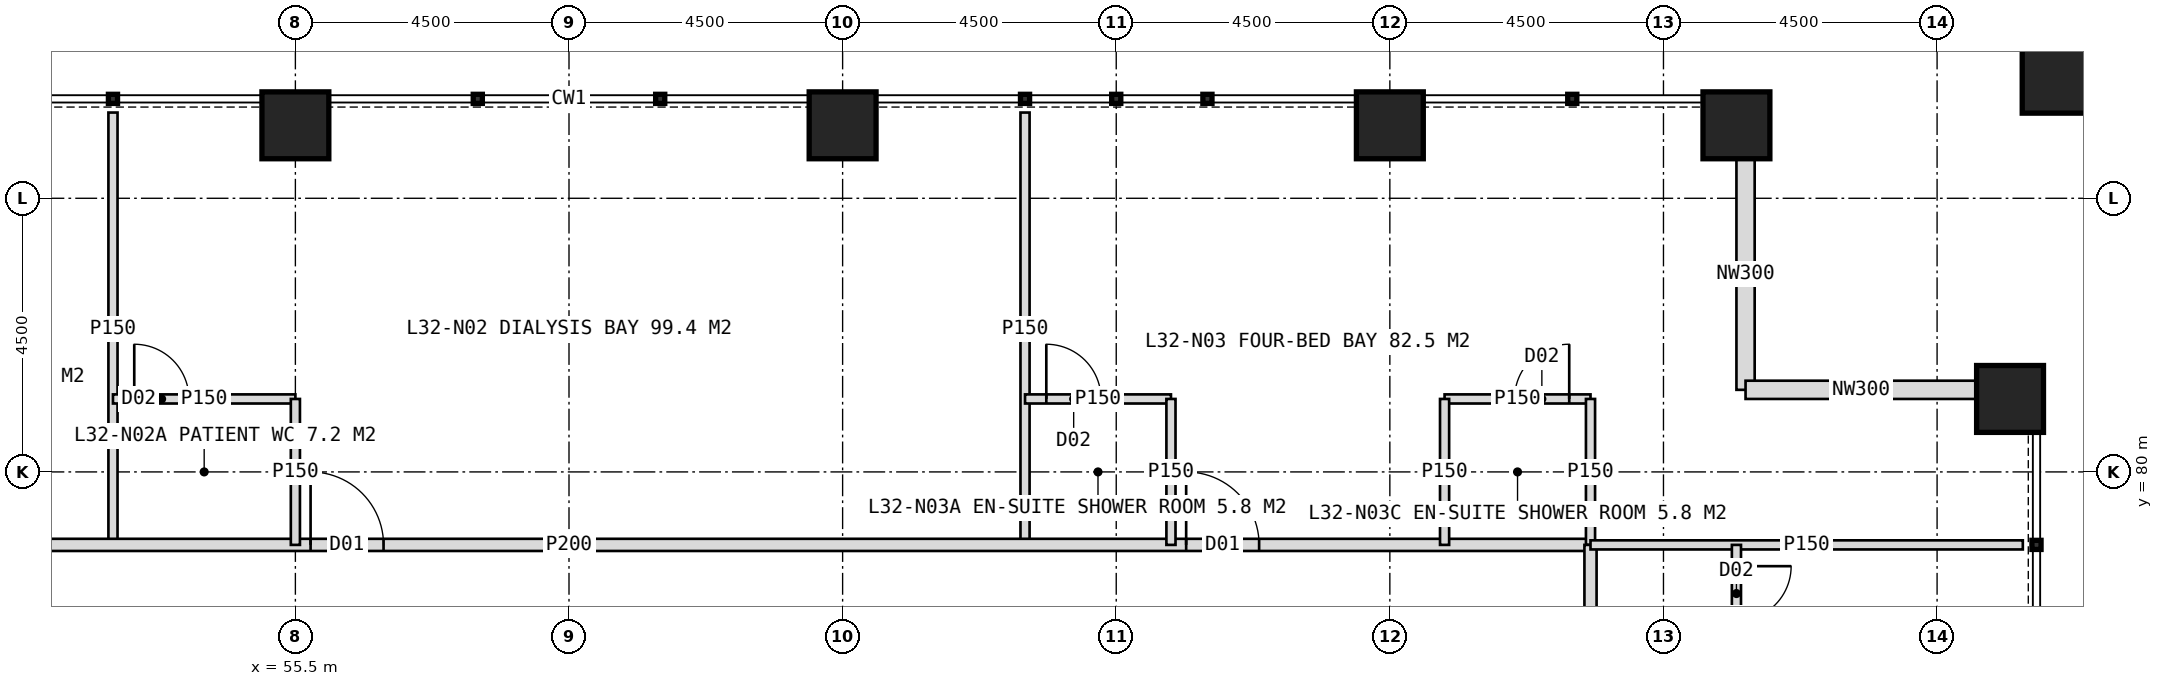
"""IFC4 building model, lengths in metres.
Left out: names, types, materials, properties, quantities, classifications, styles, units other than length and angle.
Written with IfcOpenShell. Run it as: python <this file> out.ifc"""

import sys

from ifc_helpers import new_model, si_unit, direction, frame, frame_2d, origin, origin_2d, place, context, subcontext, project, spatial, rectangle, hollow_rectangle, extrude, element, fill, save


model = new_model("IFC4")
c1 = context("Model", 3, precision=1e-05, world=origin(), true_north=direction((0.0, 1.0)))
c2 = subcontext(c1, "Body", "Model", "MODEL_VIEW")
j1 = project(units=[si_unit("LENGTHUNIT", "METRE"), si_unit("PLANEANGLEUNIT", "RADIAN")], contexts=[c1])
p1 = place(None, origin())
s1 = spatial("IfcSite", under=j1, at=p1, CompositionType="ELEMENT")
p2 = place(p1, origin())
s2 = spatial("IfcBuilding", under=s1, at=p2, CompositionType="ELEMENT")
p3 = place(p2, frame((0.0, 0.0, 136.0)))
s3 = spatial("IfcBuildingStorey", under=s2, at=p3, CompositionType="ELEMENT", Elevation=136.0)
for number, where, z_axis, x_axis in (
    (1, (55.5, 85.7, 0.0), (0.0, 0.0, 1.0), (1.0, 0.0, 0.0)),
    (2, (64.5, 85.7, 0.0), (0.0, 0.0, 1.0), (1.0, 0.0, 0.0)),
    (3, (73.5, 85.7, 0.0), (0.0, 0.0, 1.0), (1.0, 0.0, 0.0)),
    (4, (79.2, 85.7, 0.0), (0.0, 0.0, 1.0), (1.0, 0.0, 0.0)),
    (5, (83.7, 81.2, 0.0), (0.0, 0.0, 1.0), (1.0, 0.0, 0.0)),
):
    element("IfcColumn", number, at=place(p3, frame(where, z_axis=z_axis, x_axis=x_axis)), inside=s3, PredefinedType="COLUMN", context=c2, shape_type="SweptSolid", body=[
        extrude(hollow_rectangle(XDim=1.1, YDim=1.1, WallThickness=0.1, at=origin_2d()), origin(), (0.0, 0.0, 1.0), 4.0),
    ])
p4 = place(p3, frame((84.6, 86.6, 0.0), z_axis=(0.0, 0.0, 1.0), x_axis=(1.0, 0.0, 0.0)))
e6 = element("IfcColumn", 6, at=p4, inside=s3, PredefinedType="COLUMN", context=c2, shape_type="SweptSolid", body=[
    extrude(hollow_rectangle(XDim=1.4, YDim=1.4, WallThickness=0.08, at=origin_2d()), origin(), (0.0, 0.0, 1.0), 4.0),
])
for number, where, z_axis, x_axis in (
    (7, (79.35, 85.15, 0.0), (0.0, 0.0, 1.0), (0.0, -1.0, 0.0)),
    (8, (79.35, 81.35, 0.0), (0.0, 0.0, 1.0), (1.0, 0.0, 0.0)),
):
    element("IfcWall", number, at=place(p3, frame(where, z_axis=z_axis, x_axis=x_axis)), inside=s3, PredefinedType="ELEMENTEDWALL", context=c2, shape_type="SweptSolid", body=[
        extrude(rectangle(XDim=3.8, YDim=0.3, at=frame_2d((1.9, 0.0))), origin(), (0.0, 0.0, 1.0), 4.0),
    ])
for number, where, z_axis, x_axis in (
    (9, (52.5, 78.8, 0.0), (0.0, 0.0, 1.0), (0.0, 1.0, 0.0)),
    (10, (67.5, 78.8, 0.0), (0.0, 0.0, 1.0), (0.0, 1.0, 0.0)),
):
    element("IfcWall", number, at=place(p3, frame(where, z_axis=z_axis, x_axis=x_axis)), inside=s3, PredefinedType="PARTITIONING", context=c2, shape_type="SweptSolid", body=[
        extrude(rectangle(XDim=7.11, YDim=0.15, at=frame_2d((3.555, 0.0))), origin(), (0.0, 0.0, 1.0), 3.75),
    ])
p5 = place(p3, frame((43.2, 78.8, 0.0), z_axis=(0.0, 0.0, 1.0), x_axis=(1.0, 0.0, 0.0)))
e11 = element("IfcWall", 11, at=p5, inside=s3, PredefinedType="PARTITIONING", context=c2, shape_type="SweptSolid", body=[
    extrude(rectangle(XDim=33.6, YDim=0.2, at=frame_2d((16.8, 0.0))), origin(), (0.0, 0.0, 1.0), 3.75),
])
p6 = place(p5, frame((3.25, 0.0, 0.0)))
e12 = element("IfcOpeningElement", 12, at=p6, cuts=e11, PredefinedType="OPENING", context=c2, shape_type="SweptSolid", body=[
    extrude(rectangle(XDim=1.2, YDim=2.2, at=frame_2d((0.6, 1.1))), frame((0.0, 0.11, 0.0), z_axis=(0.0, -1.0, 0.0), x_axis=(1.0, 0.0, 0.0)), (0.0, 0.0, 1.0), 0.22),
])
p7 = place(p5, frame((12.55, 0.0, 0.0)))
e13 = element("IfcOpeningElement", 13, at=p7, cuts=e11, PredefinedType="OPENING", context=c2, shape_type="SweptSolid", body=[
    extrude(rectangle(XDim=1.2, YDim=2.2, at=frame_2d((0.6, 1.1))), frame((0.0, 0.11, 0.0), z_axis=(0.0, -1.0, 0.0), x_axis=(1.0, 0.0, 0.0)), (0.0, 0.0, 1.0), 0.22),
])
p8 = place(p5, frame((26.95, 0.0, 0.0)))
e14 = element("IfcOpeningElement", 14, at=p8, cuts=e11, PredefinedType="OPENING", context=c2, shape_type="SweptSolid", body=[
    extrude(rectangle(XDim=1.2, YDim=2.2, at=frame_2d((0.6, 1.1))), frame((0.0, 0.11, 0.0), z_axis=(0.0, -1.0, 0.0), x_axis=(1.0, 0.0, 0.0)), (0.0, 0.0, 1.0), 0.22),
])
p9 = place(p3, frame((52.5, 81.2, 0.0), z_axis=(0.0, 0.0, 1.0), x_axis=(1.0, 0.0, 0.0)))
e15 = element("IfcWall", 15, at=p9, inside=s3, PredefinedType="PARTITIONING", context=c2, shape_type="SweptSolid", body=[
    extrude(rectangle(XDim=3.0, YDim=0.15, at=frame_2d((1.5, 0.0))), origin(), (0.0, 0.0, 1.0), 3.75),
])
p10 = place(p9, frame((0.35, 0.0, 0.0)))
e16 = element("IfcOpeningElement", 16, at=p10, cuts=e15, PredefinedType="OPENING", context=c2, shape_type="SweptSolid", body=[
    extrude(rectangle(XDim=0.9, YDim=2.1, at=frame_2d((0.45, 1.05))), frame((0.0, 0.085, 0.0), z_axis=(0.0, -1.0, 0.0), x_axis=(1.0, 0.0, 0.0)), (0.0, 0.0, 1.0), 0.17),
])
p11 = place(p3, frame((55.5, 78.8, 0.0), z_axis=(0.0, 0.0, 1.0), x_axis=(0.0, 1.0, 0.0)))
e17 = element("IfcWall", 17, at=p11, inside=s3, PredefinedType="PARTITIONING", context=c2, shape_type="SweptSolid", body=[
    extrude(rectangle(XDim=2.4, YDim=0.15, at=frame_2d((1.2, 0.0))), origin(), (0.0, 0.0, 1.0), 2.95),
])
p12 = place(p3, frame((67.5, 81.2, 0.0), z_axis=(0.0, 0.0, 1.0), x_axis=(1.0, 0.0, 0.0)))
e18 = element("IfcWall", 18, at=p12, inside=s3, PredefinedType="PARTITIONING", context=c2, shape_type="SweptSolid", body=[
    extrude(rectangle(XDim=2.4, YDim=0.15, at=frame_2d((1.2, 0.0))), origin(), (0.0, 0.0, 1.0), 3.75),
])
p13 = place(p12, frame((0.35, 0.0, 0.0)))
e19 = element("IfcOpeningElement", 19, at=p13, cuts=e18, PredefinedType="OPENING", context=c2, shape_type="SweptSolid", body=[
    extrude(rectangle(XDim=0.9, YDim=2.1, at=frame_2d((0.45, 1.05))), frame((0.0, 0.085, 0.0), z_axis=(0.0, -1.0, 0.0), x_axis=(1.0, 0.0, 0.0)), (0.0, 0.0, 1.0), 0.17),
])
p14 = place(p3, frame((69.9, 78.8, 0.0), z_axis=(0.0, 0.0, 1.0), x_axis=(0.0, 1.0, 0.0)))
e20 = element("IfcWall", 20, at=p14, inside=s3, PredefinedType="PARTITIONING", context=c2, shape_type="SweptSolid", body=[
    extrude(rectangle(XDim=2.4, YDim=0.15, at=frame_2d((1.2, 0.0))), origin(), (0.0, 0.0, 1.0), 3.75),
])
p15 = place(p3, frame((74.4, 81.2, 0.0), z_axis=(0.0, 0.0, 1.0), x_axis=(1.0, 0.0, 0.0)))
e21 = element("IfcWall", 21, at=p15, inside=s3, PredefinedType="PARTITIONING", context=c2, shape_type="SweptSolid", body=[
    extrude(rectangle(XDim=2.4, YDim=0.15, at=frame_2d((1.2, 0.0))), origin(), (0.0, 0.0, 1.0), 2.997),
])
p16 = place(p15, frame((1.15, 0.0, 0.0)))
e22 = element("IfcOpeningElement", 22, at=p16, cuts=e21, PredefinedType="OPENING", context=c2, shape_type="SweptSolid", body=[
    extrude(rectangle(XDim=0.9, YDim=2.1, at=frame_2d((0.45, 1.05))), frame((0.0, 0.085, 0.0), z_axis=(0.0, -1.0, 0.0), x_axis=(1.0, 0.0, 0.0)), (0.0, 0.0, 1.0), 0.17),
])
for number, where, z_axis, x_axis in (
    (23, (74.4, 78.8, 0.0), (0.0, 0.0, 1.0), (0.0, 1.0, 0.0)),
    (24, (76.8, 78.8, 0.0), (0.0, 0.0, 1.0), (0.0, 1.0, 0.0)),
):
    element("IfcWall", number, at=place(p3, frame(where, z_axis=z_axis, x_axis=x_axis)), inside=s3, PredefinedType="PARTITIONING", context=c2, shape_type="SweptSolid", body=[
        extrude(rectangle(XDim=2.4, YDim=0.15, at=frame_2d((1.2, 0.0))), origin(), (0.0, 0.0, 1.0), 3.75),
    ])
p17 = place(p3, frame((76.8, 78.8, 0.0), z_axis=(0.0, 0.0, 1.0), x_axis=(0.0, -1.0, 0.0)))
e25 = element("IfcWall", 25, at=p17, inside=s3, PredefinedType="PARTITIONING", context=c2, shape_type="SweptSolid", body=[
    extrude(rectangle(XDim=33.6, YDim=0.2, at=frame_2d((16.8, 0.0))), origin(), (0.0, 0.0, 1.0), 3.75),
])
p18 = place(p17, frame((2.65, 0.0, 0.0)))
e26 = element("IfcOpeningElement", 26, at=p18, cuts=e25, PredefinedType="OPENING", context=c2, shape_type="SweptSolid", body=[
    extrude(rectangle(XDim=1.2, YDim=2.2, at=frame_2d((0.6, 1.1))), frame((0.0, 0.11, 0.0), z_axis=(0.0, -1.0, 0.0), x_axis=(1.0, 0.0, 0.0)), (0.0, 0.0, 1.0), 0.22),
])
p19 = place(p17, frame((8.95, 0.0, 0.0)))
e27 = element("IfcOpeningElement", 27, at=p19, cuts=e25, PredefinedType="OPENING", context=c2, shape_type="SweptSolid", body=[
    extrude(rectangle(XDim=1.2, YDim=2.2, at=frame_2d((0.6, 1.1))), frame((0.0, 0.11, 0.0), z_axis=(0.0, -1.0, 0.0), x_axis=(1.0, 0.0, 0.0)), (0.0, 0.0, 1.0), 0.22),
])
p20 = place(p17, frame((19.45, 0.0, 0.0)))
e28 = element("IfcOpeningElement", 28, at=p20, cuts=e25, PredefinedType="OPENING", context=c2, shape_type="SweptSolid", body=[
    extrude(rectangle(XDim=1.2, YDim=2.2, at=frame_2d((0.6, 1.1))), frame((0.0, 0.11, 0.0), z_axis=(0.0, -1.0, 0.0), x_axis=(1.0, 0.0, 0.0)), (0.0, 0.0, 1.0), 0.22),
])
p21 = place(p17, frame((28.45, 0.0, 0.0)))
e29 = element("IfcOpeningElement", 29, at=p21, cuts=e25, PredefinedType="OPENING", context=c2, shape_type="SweptSolid", body=[
    extrude(rectangle(XDim=1.2, YDim=2.2, at=frame_2d((0.6, 1.1))), frame((0.0, 0.11, 0.0), z_axis=(0.0, -1.0, 0.0), x_axis=(1.0, 0.0, 0.0)), (0.0, 0.0, 1.0), 0.22),
])
p22 = place(p3, frame((76.8, 78.8, 0.0), z_axis=(0.0, 0.0, 1.0), x_axis=(1.0, 0.0, 0.0)))
e30 = element("IfcWall", 30, at=p22, inside=s3, PredefinedType="PARTITIONING", context=c2, shape_type="SweptSolid", body=[
    extrude(rectangle(XDim=7.11, YDim=0.15, at=frame_2d((3.555, 0.0))), origin(), (0.0, 0.0, 1.0), 3.75),
])
p23 = place(p3, frame((79.2, 78.8, 0.0), z_axis=(0.0, 0.0, 1.0), x_axis=(0.0, -1.0, 0.0)))
e31 = element("IfcWall", 31, at=p23, inside=s3, PredefinedType="PARTITIONING", context=c2, shape_type="SweptSolid", body=[
    extrude(rectangle(XDim=2.4, YDim=0.15, at=frame_2d((1.2, 0.0))), origin(), (0.0, 0.0, 1.0), 2.997),
])
p24 = place(p23, frame((0.35, 0.0, 0.0)))
e32 = element("IfcOpeningElement", 32, at=p24, cuts=e31, PredefinedType="OPENING", context=c2, shape_type="SweptSolid", body=[
    extrude(rectangle(XDim=0.9, YDim=2.1, at=frame_2d((0.45, 1.05))), frame((0.0, 0.085, 0.0), z_axis=(0.0, -1.0, 0.0), x_axis=(1.0, 0.0, 0.0)), (0.0, 0.0, 1.0), 0.17),
])
p25 = place(p7, origin())
e33 = element("IfcDoor", 33, at=p25, inside=s3, OperationType="SINGLE_SWING_LEFT", PredefinedType="DOOR", context=c2, shape_type="SweptSolid", body=[
    extrude(rectangle(XDim=1.2, YDim=2.2, at=frame_2d((0.6, 1.1))), frame((0.0, 0.025, 0.0), z_axis=(0.0, -1.0, 0.0), x_axis=(1.0, 0.0, 0.0)), (0.0, 0.0, 1.0), 0.05),
])
fill(e13, e33)
p26 = place(p10, origin())
e34 = element("IfcDoor", 34, at=p26, inside=s3, OperationType="SINGLE_SWING_LEFT", PredefinedType="DOOR", context=c2, shape_type="SweptSolid", body=[
    extrude(rectangle(XDim=0.9, YDim=2.1, at=frame_2d((0.45, 1.05))), frame((0.0, 0.025, 0.0), z_axis=(0.0, -1.0, 0.0), x_axis=(1.0, 0.0, 0.0)), (0.0, 0.0, 1.0), 0.05),
])
fill(e16, e34)
p27 = place(p8, origin())
e35 = element("IfcDoor", 35, at=p27, inside=s3, OperationType="SINGLE_SWING_LEFT", PredefinedType="DOOR", context=c2, shape_type="SweptSolid", body=[
    extrude(rectangle(XDim=1.2, YDim=2.2, at=frame_2d((0.6, 1.1))), frame((0.0, 0.025, 0.0), z_axis=(0.0, -1.0, 0.0), x_axis=(1.0, 0.0, 0.0)), (0.0, 0.0, 1.0), 0.05),
])
fill(e14, e35)
p28 = place(p13, origin())
e36 = element("IfcDoor", 36, at=p28, inside=s3, OperationType="SINGLE_SWING_LEFT", PredefinedType="DOOR", context=c2, shape_type="SweptSolid", body=[
    extrude(rectangle(XDim=0.9, YDim=2.1, at=frame_2d((0.45, 1.05))), frame((0.0, 0.025, 0.0), z_axis=(0.0, -1.0, 0.0), x_axis=(1.0, 0.0, 0.0)), (0.0, 0.0, 1.0), 0.05),
])
fill(e19, e36)
p29 = place(p16, origin())
e37 = element("IfcDoor", 37, at=p29, inside=s3, OperationType="SINGLE_SWING_RIGHT", PredefinedType="DOOR", context=c2, shape_type="SweptSolid", body=[
    extrude(rectangle(XDim=0.9, YDim=2.1, at=frame_2d((0.45, 1.05))), frame((0.0, 0.025, 0.0), z_axis=(0.0, -1.0, 0.0), x_axis=(1.0, 0.0, 0.0)), (0.0, 0.0, 1.0), 0.05),
])
fill(e22, e37)
p30 = place(p24, origin())
e38 = element("IfcDoor", 38, at=p30, inside=s3, OperationType="SINGLE_SWING_LEFT", PredefinedType="DOOR", context=c2, shape_type="SweptSolid", body=[
    extrude(rectangle(XDim=0.9, YDim=2.1, at=frame_2d((0.45, 1.05))), frame((0.0, 0.025, 0.0), z_axis=(0.0, -1.0, 0.0), x_axis=(1.0, 0.0, 0.0)), (0.0, 0.0, 1.0), 0.05),
])
fill(e32, e38)
save(model, sys.argv[1])
